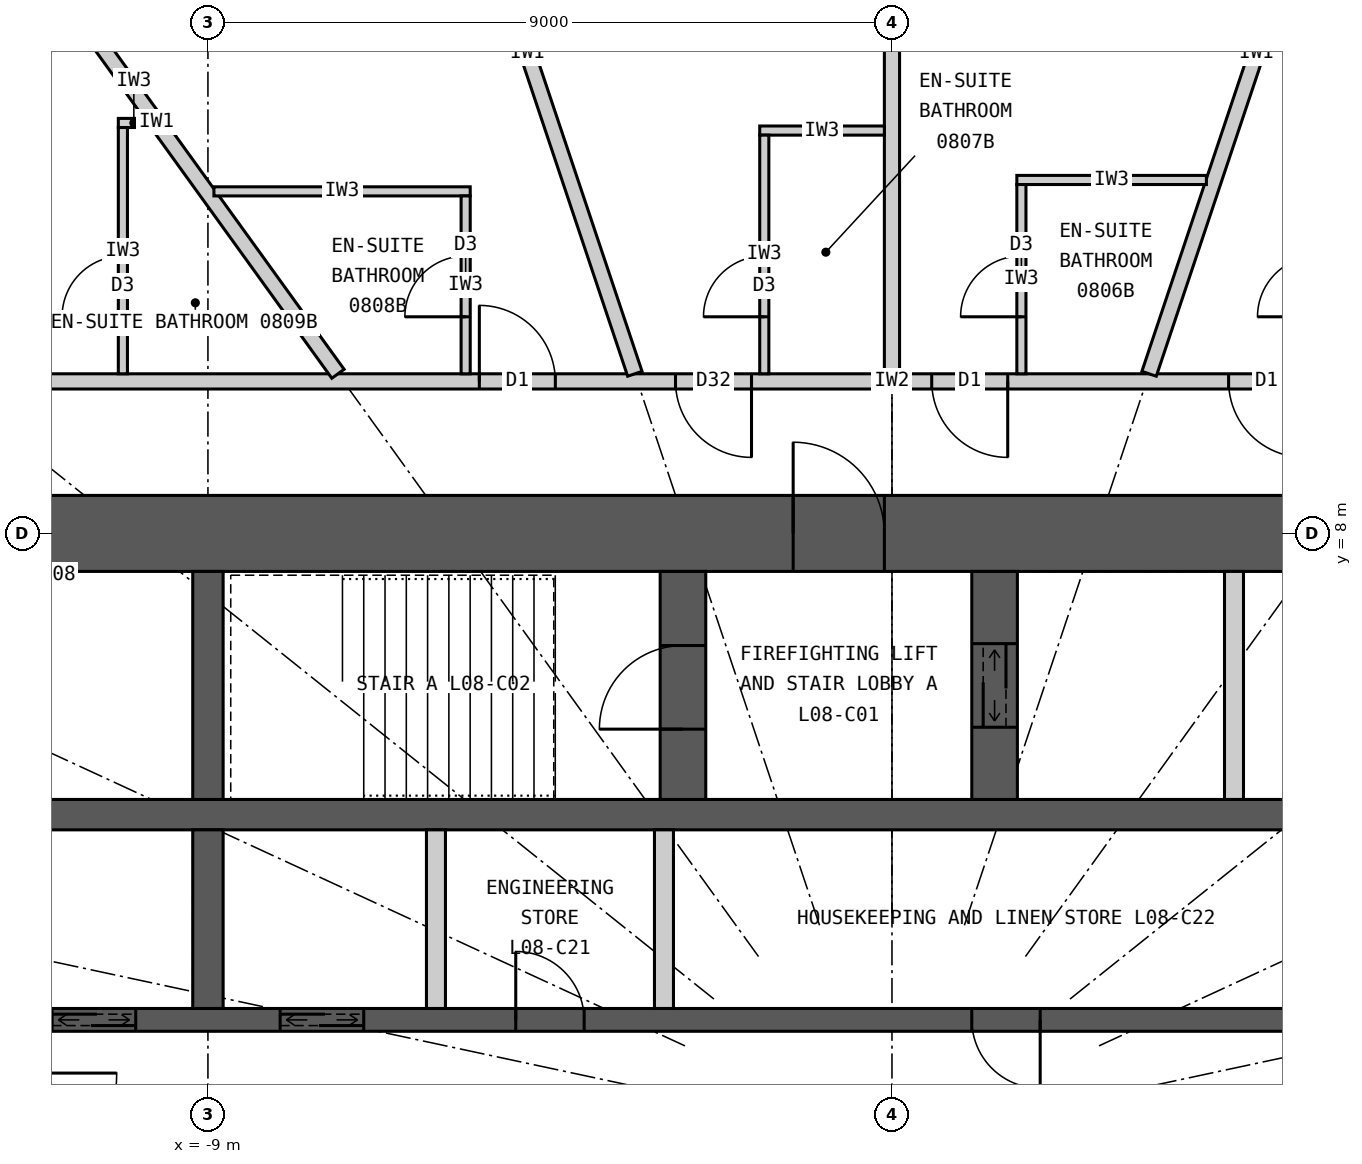
"""IFC4 building model, lengths in metres.
Left out: names, types, materials, properties, quantities, classifications, styles, units other than length and angle.
Written with IfcOpenShell. Run it as: python <this file> out.ifc"""

import sys

from ifc_helpers import new_model, si_unit, direction, frame, frame_2d, origin, place, context, subcontext, project, spatial, rectangle, extrude, element, fill, save


model = new_model("IFC4")
c1 = context("Model", 3, precision=1e-05, world=origin(), true_north=direction((0.0, 1.0)))
c2 = subcontext(c1, "Body", "Model", "MODEL_VIEW")
j1 = project(units=[si_unit("LENGTHUNIT", "METRE"), si_unit("PLANEANGLEUNIT", "RADIAN")], contexts=[c1])
p1 = place(None, origin())
s1 = spatial("IfcSite", under=j1, at=p1, CompositionType="ELEMENT")
p2 = place(p1, origin())
s2 = spatial("IfcBuilding", under=s1, at=p2, CompositionType="ELEMENT")
p3 = place(p2, frame((0.0, 0.0, 39.3)))
s3 = spatial("IfcBuildingStorey", under=s2, at=p3, CompositionType="ELEMENT", Elevation=39.3)
p4 = place(p3, frame((-12.5, 8.0, 0.0), z_axis=(0.0, 0.0, 1.0), x_axis=(1.0, 0.0, 0.0)))
e1 = element("IfcWall", 1, at=p4, inside=s3, PredefinedType="SHEAR", context=c2, shape_type="SweptSolid", body=[
    extrude(rectangle(XDim=25.0, YDim=1.0, at=frame_2d((12.5, 0.0))), origin(), (0.0, 0.0, 1.0), 3.3),
])
p5 = place(p4, frame((11.2, 0.0, 0.0)))
e2 = element("IfcOpeningElement", 2, at=p5, cuts=e1, PredefinedType="OPENING", context=c2, shape_type="SweptSolid", body=[
    extrude(rectangle(XDim=1.2, YDim=2.2, at=frame_2d((0.6, 1.1))), frame((0.0, 0.51, 0.0), z_axis=(0.0, -1.0, 0.0), x_axis=(1.0, 0.0, 0.0)), (0.0, 0.0, 1.0), 1.02),
])
p6 = place(p4, frame((18.8, 0.0, 0.0)))
e3 = element("IfcOpeningElement", 3, at=p6, cuts=e1, PredefinedType="OPENING", context=c2, shape_type="SweptSolid", body=[
    extrude(rectangle(XDim=0.9, YDim=2.2, at=frame_2d((0.45, 1.1))), frame((0.0, 0.51, 0.0), z_axis=(0.0, -1.0, 0.0), x_axis=(1.0, 0.0, 0.0)), (0.0, 0.0, 1.0), 1.02),
])
p7 = place(p3, frame((-11.5, 4.3, 0.0), z_axis=(0.0, 0.0, 1.0), x_axis=(1.0, 0.0, 0.0)))
e4 = element("IfcWall", 4, at=p7, inside=s3, PredefinedType="SHEAR", context=c2, shape_type="SweptSolid", body=[
    extrude(rectangle(XDim=23.0, YDim=0.4, at=frame_2d((11.5, 0.0))), origin(), (0.0, 0.0, 1.0), 3.3),
])
p8 = place(p3, frame((-11.5, 1.6, 0.0), z_axis=(0.0, 0.0, 1.0), x_axis=(1.0, 0.0, 0.0)))
e5 = element("IfcWall", 5, at=p8, inside=s3, PredefinedType="SHEAR", context=c2, shape_type="SweptSolid", body=[
    extrude(rectangle(XDim=23.0, YDim=0.3, at=frame_2d((11.5, 0.0))), origin(), (0.0, 0.0, 1.0), 3.3),
])
p9 = place(p8, frame((0.45, 0.0, 0.0)))
e6 = element("IfcOpeningElement", 6, at=p9, cuts=e5, PredefinedType="OPENING", context=c2, shape_type="SweptSolid", body=[
    extrude(rectangle(XDim=1.1, YDim=2.2, at=frame_2d((0.55, 1.1))), frame((0.0, 0.16, 0.0), z_axis=(0.0, -1.0, 0.0), x_axis=(1.0, 0.0, 0.0)), (0.0, 0.0, 1.0), 0.32),
])
p10 = place(p8, frame((3.45, 0.0, 0.0)))
e7 = element("IfcOpeningElement", 7, at=p10, cuts=e5, PredefinedType="OPENING", context=c2, shape_type="SweptSolid", body=[
    extrude(rectangle(XDim=1.1, YDim=2.2, at=frame_2d((0.55, 1.1))), frame((0.0, 0.16, 0.0), z_axis=(0.0, -1.0, 0.0), x_axis=(1.0, 0.0, 0.0)), (0.0, 0.0, 1.0), 0.32),
])
p11 = place(p8, frame((6.55, 0.0, 0.0)))
e8 = element("IfcOpeningElement", 8, at=p11, cuts=e5, PredefinedType="OPENING", context=c2, shape_type="SweptSolid", body=[
    extrude(rectangle(XDim=0.9, YDim=2.2, at=frame_2d((0.45, 1.1))), frame((0.0, 0.16, 0.0), z_axis=(0.0, -1.0, 0.0), x_axis=(1.0, 0.0, 0.0)), (0.0, 0.0, 1.0), 0.32),
])
p12 = place(p8, frame((12.55, 0.0, 0.0)))
e9 = element("IfcOpeningElement", 9, at=p12, cuts=e5, PredefinedType="OPENING", context=c2, shape_type="SweptSolid", body=[
    extrude(rectangle(XDim=0.9, YDim=2.2, at=frame_2d((0.45, 1.1))), frame((0.0, 0.16, 0.0), z_axis=(0.0, -1.0, 0.0), x_axis=(1.0, 0.0, 0.0)), (0.0, 0.0, 1.0), 0.32),
])
p13 = place(p3, frame((-9.0, 4.5, 0.0), z_axis=(0.0, 0.0, 1.0), x_axis=(0.0, 1.0, 0.0)))
e10 = element("IfcWall", 10, at=p13, inside=s3, PredefinedType="SHEAR", context=c2, shape_type="SweptSolid", body=[
    extrude(rectangle(XDim=3.0, YDim=0.4, at=frame_2d((1.5, 0.0))), origin(), (0.0, 0.0, 1.0), 3.3),
])
p14 = place(p3, frame((-9.0, 1.75, 0.0), z_axis=(0.0, 0.0, 1.0), x_axis=(0.0, 1.0, 0.0)))
e11 = element("IfcWall", 11, at=p14, inside=s3, PredefinedType="SHEAR", context=c2, shape_type="SweptSolid", body=[
    extrude(rectangle(XDim=2.35, YDim=0.4, at=frame_2d((1.175, 0.0))), origin(), (0.0, 0.0, 1.0), 3.3),
])
p15 = place(p3, frame((-2.75, 4.5, 0.0), z_axis=(0.0, 0.0, 1.0), x_axis=(0.0, 1.0, 0.0)))
e12 = element("IfcWall", 12, at=p15, inside=s3, PredefinedType="SHEAR", context=c2, shape_type="SweptSolid", body=[
    extrude(rectangle(XDim=3.0, YDim=0.6, at=frame_2d((1.5, 0.0))), origin(), (0.0, 0.0, 1.0), 3.3),
])
p16 = place(p15, frame((0.925, 0.0, 0.0)))
e13 = element("IfcOpeningElement", 13, at=p16, cuts=e12, PredefinedType="OPENING", context=c2, shape_type="SweptSolid", body=[
    extrude(rectangle(XDim=1.1, YDim=2.2, at=frame_2d((0.55, 1.1))), frame((0.0, 0.31, 0.0), z_axis=(0.0, -1.0, 0.0), x_axis=(1.0, 0.0, 0.0)), (0.0, 0.0, 1.0), 0.62),
])
p17 = place(p3, frame((1.35, 4.5, 0.0), z_axis=(0.0, 0.0, 1.0), x_axis=(0.0, 1.0, 0.0)))
e14 = element("IfcWall", 14, at=p17, inside=s3, PredefinedType="SHEAR", context=c2, shape_type="SweptSolid", body=[
    extrude(rectangle(XDim=3.0, YDim=0.6, at=frame_2d((1.5, 0.0))), origin(), (0.0, 0.0, 1.0), 3.3),
])
p18 = place(p17, frame((0.95, 0.0, 0.0)))
e15 = element("IfcOpeningElement", 15, at=p18, cuts=e14, PredefinedType="OPENING", context=c2, shape_type="SweptSolid", body=[
    extrude(rectangle(XDim=1.1, YDim=2.2, at=frame_2d((0.55, 1.1))), frame((0.0, 0.31, 0.0), z_axis=(0.0, -1.0, 0.0), x_axis=(1.0, 0.0, 0.0)), (0.0, 0.0, 1.0), 0.62),
])
p19 = place(p3, frame((4.5, 4.5, 0.0), z_axis=(0.0, 0.0, 1.0), x_axis=(0.0, 1.0, 0.0)))
e16 = element("IfcWall", 16, at=p19, inside=s3, PredefinedType="PARTITIONING", context=c2, shape_type="SweptSolid", body=[
    extrude(rectangle(XDim=3.0, YDim=0.25, at=frame_2d((1.5, 0.0))), origin(), (0.0, 0.0, 1.0), 3.3),
])
for number, where, z_axis, x_axis in (
    (17, (-6.0, 1.75, 0.0), (0.0, 0.0, 1.0), (0.0, 1.0, 0.0)),
    (18, (-3.0, 1.75, 0.0), (0.0, 0.0, 1.0), (0.0, 1.0, 0.0)),
):
    element("IfcWall", number, at=place(p3, frame(where, z_axis=z_axis, x_axis=x_axis)), inside=s3, PredefinedType="PARTITIONING", context=c2, shape_type="SweptSolid", body=[
        extrude(rectangle(XDim=2.35, YDim=0.25, at=frame_2d((1.175, 0.0))), origin(), (0.0, 0.0, 1.0), 3.3),
    ])
p20 = place(p3, frame((-14.1, 10.0, 0.0), z_axis=(0.0, 0.0, 1.0), x_axis=(1.0, 0.0, 0.0)))
e19 = element("IfcWall", 19, at=p20, inside=s3, PredefinedType="PARTITIONING", context=c2, shape_type="SweptSolid", body=[
    extrude(rectangle(XDim=28.2, YDim=0.2, at=frame_2d((14.1, 0.0))), origin(), (0.0, 0.0, 1.0), 3.12),
])
p21 = place(p20, frame((23.477, 0.0, 0.0)))
e20 = element("IfcOpeningElement", 20, at=p21, cuts=e19, PredefinedType="OPENING", context=c2, shape_type="SweptSolid", body=[
    extrude(rectangle(XDim=1.0, YDim=2.2, at=frame_2d((0.5, 1.1))), frame((0.0, 0.11, 0.0), z_axis=(0.0, -1.0, 0.0), x_axis=(1.0, 0.0, 0.0)), (0.0, 0.0, 1.0), 0.22),
])
p22 = place(p20, frame((18.529, 0.0, 0.0)))
e21 = element("IfcOpeningElement", 21, at=p22, cuts=e19, PredefinedType="OPENING", context=c2, shape_type="SweptSolid", body=[
    extrude(rectangle(XDim=1.0, YDim=2.2, at=frame_2d((0.5, 1.1))), frame((0.0, 0.11, 0.0), z_axis=(0.0, -1.0, 0.0), x_axis=(1.0, 0.0, 0.0)), (0.0, 0.0, 1.0), 0.22),
])
p23 = place(p20, frame((14.623, 0.0, 0.0)))
e22 = element("IfcOpeningElement", 22, at=p23, cuts=e19, PredefinedType="OPENING", context=c2, shape_type="SweptSolid", body=[
    extrude(rectangle(XDim=1.0, YDim=2.2, at=frame_2d((0.5, 1.1))), frame((0.0, 0.11, 0.0), z_axis=(0.0, -1.0, 0.0), x_axis=(1.0, 0.0, 0.0)), (0.0, 0.0, 1.0), 0.22),
])
p24 = place(p20, frame((11.252, 0.0, 0.0)))
e23 = element("IfcOpeningElement", 23, at=p24, cuts=e19, PredefinedType="OPENING", context=c2, shape_type="SweptSolid", body=[
    extrude(rectangle(XDim=1.0, YDim=2.1, at=frame_2d((0.5, 1.05))), frame((0.0, 0.11, 0.0), z_axis=(0.0, -1.0, 0.0), x_axis=(1.0, 0.0, 0.0)), (0.0, 0.0, 1.0), 0.22),
])
p25 = place(p20, frame((8.671, 0.0, 0.0)))
e24 = element("IfcOpeningElement", 24, at=p25, cuts=e19, PredefinedType="OPENING", context=c2, shape_type="SweptSolid", body=[
    extrude(rectangle(XDim=1.0, YDim=2.2, at=frame_2d((0.5, 1.1))), frame((0.0, 0.11, 0.0), z_axis=(0.0, -1.0, 0.0), x_axis=(1.0, 0.0, 0.0)), (0.0, 0.0, 1.0), 0.22),
])
p26 = place(p20, frame((1.616, 0.0, 0.0)))
e25 = element("IfcOpeningElement", 25, at=p26, cuts=e19, PredefinedType="OPENING", context=c2, shape_type="SweptSolid", body=[
    extrude(rectangle(XDim=1.0, YDim=2.2, at=frame_2d((0.5, 1.1))), frame((0.0, 0.11, 0.0), z_axis=(0.0, -1.0, 0.0), x_axis=(1.0, 0.0, 0.0)), (0.0, 0.0, 1.0), 0.22),
])
p27 = place(p3, frame((3.383, 10.1, 0.0), z_axis=(0.0, 0.0, 1.0), x_axis=(0.317593727596, 0.948226884344, 0.0)))
e26 = element("IfcWall", 26, at=p27, inside=s3, PredefinedType="PARTITIONING", context=c2, shape_type="SweptSolid", body=[
    extrude(rectangle(XDim=8.899, YDim=0.2, at=frame_2d((4.449, 0.0))), origin(), (0.0, 0.0, 1.0), 2.32),
])
p28 = place(p3, frame((0.0, 10.1, 0.0), z_axis=(0.0, 0.0, 1.0), x_axis=(0.0, 1.0, 0.0)))
e27 = element("IfcWall", 27, at=p28, inside=s3, PredefinedType="PARTITIONING", context=c2, shape_type="SweptSolid", body=[
    extrude(rectangle(XDim=9.05, YDim=0.2, at=frame_2d((4.525, 0.0))), origin(), (0.0, 0.0, 1.0), 2.32),
])
p29 = place(p3, frame((-3.383, 10.1, 0.0), z_axis=(0.0, 0.0, 1.0), x_axis=(-0.317593727596, 0.948226884344, 0.0)))
e28 = element("IfcWall", 28, at=p29, inside=s3, PredefinedType="PARTITIONING", context=c2, shape_type="SweptSolid", body=[
    extrude(rectangle(XDim=8.899, YDim=0.2, at=frame_2d((4.449, 0.0))), origin(), (0.0, 0.0, 1.0), 2.32),
])
p30 = place(p3, frame((-7.289, 10.1, 0.0), z_axis=(0.0, 0.0, 1.0), x_axis=(-0.585216319319, 0.810877216108, 0.0)))
e29 = element("IfcWall", 29, at=p30, inside=s3, PredefinedType="PARTITIONING", context=c2, shape_type="SweptSolid", body=[
    extrude(rectangle(XDim=8.16, YDim=0.2, at=frame_2d((4.08, 0.0))), origin(), (0.0, 0.0, 1.0), 2.32),
])
p31 = place(p3, frame((4.137, 12.65, 0.0), z_axis=(0.0, 0.0, 1.0), x_axis=(-1.0, 0.0, 0.0)))
e30 = element("IfcWall", 30, at=p31, inside=s3, PredefinedType="PARTITIONING", context=c2, shape_type="SweptSolid", body=[
    extrude(rectangle(XDim=2.494, YDim=0.12, at=frame_2d((1.247, 0.0))), origin(), (0.0, 0.0, 1.0), 3.12),
])
p32 = place(p3, frame((1.703, 10.1, 0.0), z_axis=(0.0, 0.0, 1.0), x_axis=(0.0, 1.0, 0.0)))
e31 = element("IfcWall", 31, at=p32, inside=s3, PredefinedType="PARTITIONING", context=c2, shape_type="SweptSolid", body=[
    extrude(rectangle(XDim=2.49, YDim=0.12, at=frame_2d((1.245, 0.0))), origin(), (0.0, 0.0, 1.0), 3.12),
])
p33 = place(p32, frame((0.75, 0.0, 0.0)))
e32 = element("IfcOpeningElement", 32, at=p33, cuts=e31, PredefinedType="OPENING", context=c2, shape_type="SweptSolid", body=[
    extrude(rectangle(XDim=0.8, YDim=2.1, at=frame_2d((0.4, 1.05))), frame((0.0, 0.07, 0.0), z_axis=(0.0, -1.0, 0.0), x_axis=(1.0, 0.0, 0.0)), (0.0, 0.0, 1.0), 0.14),
])
p34 = place(p3, frame((-0.1, 13.3, 0.0), z_axis=(0.0, 0.0, 1.0), x_axis=(-1.0, 0.0, 0.0)))
e33 = element("IfcWall", 33, at=p34, inside=s3, PredefinedType="PARTITIONING", context=c2, shape_type="SweptSolid", body=[
    extrude(rectangle(XDim=1.64, YDim=0.12, at=frame_2d((0.82, 0.0))), origin(), (0.0, 0.0, 1.0), 3.12),
])
p35 = place(p3, frame((-1.68, 10.1, 0.0), z_axis=(0.0, 0.0, 1.0), x_axis=(0.0, 1.0, 0.0)))
e34 = element("IfcWall", 34, at=p35, inside=s3, PredefinedType="PARTITIONING", context=c2, shape_type="SweptSolid", body=[
    extrude(rectangle(XDim=3.14, YDim=0.12, at=frame_2d((1.57, 0.0))), origin(), (0.0, 0.0, 1.0), 3.12),
])
p36 = place(p35, frame((0.75, 0.0, 0.0)))
e35 = element("IfcOpeningElement", 35, at=p36, cuts=e34, PredefinedType="OPENING", context=c2, shape_type="SweptSolid", body=[
    extrude(rectangle(XDim=0.8, YDim=2.1, at=frame_2d((0.4, 1.05))), frame((0.0, 0.07, 0.0), z_axis=(0.0, -1.0, 0.0), x_axis=(1.0, 0.0, 0.0)), (0.0, 0.0, 1.0), 0.14),
])
p37 = place(p3, frame((-8.921, 12.5, 0.0), z_axis=(0.0, 0.0, 1.0), x_axis=(1.0, 0.0, 0.0)))
e36 = element("IfcWall", 36, at=p37, inside=s3, PredefinedType="PARTITIONING", context=c2, shape_type="SweptSolid", body=[
    extrude(rectangle(XDim=3.372, YDim=0.12, at=frame_2d((1.686, 0.0))), origin(), (0.0, 0.0, 1.0), 3.12),
])
p38 = place(p3, frame((-5.609, 10.1, 0.0), z_axis=(0.0, 0.0, 1.0), x_axis=(0.0, 1.0, 0.0)))
e37 = element("IfcWall", 37, at=p38, inside=s3, PredefinedType="PARTITIONING", context=c2, shape_type="SweptSolid", body=[
    extrude(rectangle(XDim=2.34, YDim=0.12, at=frame_2d((1.17, 0.0))), origin(), (0.0, 0.0, 1.0), 3.12),
])
p39 = place(p38, frame((0.75, 0.0, 0.0)))
e38 = element("IfcOpeningElement", 38, at=p39, cuts=e37, PredefinedType="OPENING", context=c2, shape_type="SweptSolid", body=[
    extrude(rectangle(XDim=0.8, YDim=2.1, at=frame_2d((0.4, 1.05))), frame((0.0, 0.07, 0.0), z_axis=(0.0, -1.0, 0.0), x_axis=(1.0, 0.0, 0.0)), (0.0, 0.0, 1.0), 0.14),
])
p40 = place(p3, frame((-9.771, 13.4, 0.0), z_axis=(0.0, 0.0, 1.0), x_axis=(-1.0, 0.0, 0.0)))
e39 = element("IfcWall", 39, at=p40, inside=s3, PredefinedType="PARTITIONING", context=c2, shape_type="SweptSolid", body=[
    extrude(rectangle(XDim=0.408, YDim=0.12, at=frame_2d((0.204, 0.0))), origin(), (0.0, 0.0, 1.0), 3.12),
])
p41 = place(p3, frame((-10.119, 10.1, 0.0), z_axis=(0.0, 0.0, 1.0), x_axis=(0.0, 1.0, 0.0)))
e40 = element("IfcWall", 40, at=p41, inside=s3, PredefinedType="PARTITIONING", context=c2, shape_type="SweptSolid", body=[
    extrude(rectangle(XDim=3.24, YDim=0.12, at=frame_2d((1.62, 0.0))), origin(), (0.0, 0.0, 1.0), 3.12),
])
p42 = place(p41, frame((0.75, 0.0, 0.0)))
e41 = element("IfcOpeningElement", 41, at=p42, cuts=e40, PredefinedType="OPENING", context=c2, shape_type="SweptSolid", body=[
    extrude(rectangle(XDim=0.8, YDim=2.1, at=frame_2d((0.4, 1.05))), frame((0.0, 0.07, 0.0), z_axis=(0.0, -1.0, 0.0), x_axis=(1.0, 0.0, 0.0)), (0.0, 0.0, 1.0), 0.14),
])
p43 = place(p22, origin())
e42 = element("IfcDoor", 42, at=p43, inside=s3, OperationType="SINGLE_SWING_RIGHT", PredefinedType="DOOR", context=c2, shape_type="SweptSolid", body=[
    extrude(rectangle(XDim=1.0, YDim=2.2, at=frame_2d((0.5, 1.1))), frame((0.0, 0.025, 0.0), z_axis=(0.0, -1.0, 0.0), x_axis=(1.0, 0.0, 0.0)), (0.0, 0.0, 1.0), 0.05),
])
fill(e21, e42)
p44 = place(p33, origin())
e43 = element("IfcDoor", 43, at=p44, inside=s3, OperationType="SINGLE_SWING_LEFT", PredefinedType="DOOR", context=c2, shape_type="SweptSolid", body=[
    extrude(rectangle(XDim=0.8, YDim=2.1, at=frame_2d((0.4, 1.05))), frame((0.0, 0.025, 0.0), z_axis=(0.0, -1.0, 0.0), x_axis=(1.0, 0.0, 0.0)), (0.0, 0.0, 1.0), 0.05),
])
fill(e32, e43)
p45 = place(p23, origin())
e44 = element("IfcDoor", 44, at=p45, inside=s3, OperationType="SINGLE_SWING_RIGHT", PredefinedType="DOOR", context=c2, shape_type="SweptSolid", body=[
    extrude(rectangle(XDim=1.0, YDim=2.2, at=frame_2d((0.5, 1.1))), frame((0.0, 0.025, 0.0), z_axis=(0.0, -1.0, 0.0), x_axis=(1.0, 0.0, 0.0)), (0.0, 0.0, 1.0), 0.05),
])
fill(e22, e44)
p46 = place(p36, origin())
e45 = element("IfcDoor", 45, at=p46, inside=s3, OperationType="SINGLE_SWING_LEFT", PredefinedType="DOOR", context=c2, shape_type="SweptSolid", body=[
    extrude(rectangle(XDim=0.8, YDim=2.1, at=frame_2d((0.4, 1.05))), frame((0.0, 0.025, 0.0), z_axis=(0.0, -1.0, 0.0), x_axis=(1.0, 0.0, 0.0)), (0.0, 0.0, 1.0), 0.05),
])
fill(e35, e45)
p47 = place(p24, origin())
e46 = element("IfcDoor", 46, at=p47, inside=s3, OperationType="SINGLE_SWING_RIGHT", PredefinedType="DOOR", context=c2, shape_type="SweptSolid", body=[
    extrude(rectangle(XDim=1.0, YDim=2.1, at=frame_2d((0.5, 1.05))), frame((0.0, 0.025, 0.0), z_axis=(0.0, -1.0, 0.0), x_axis=(1.0, 0.0, 0.0)), (0.0, 0.0, 1.0), 0.05),
])
fill(e23, e46)
p48 = place(p39, origin())
e47 = element("IfcDoor", 47, at=p48, inside=s3, OperationType="SINGLE_SWING_LEFT", PredefinedType="DOOR", context=c2, shape_type="SweptSolid", body=[
    extrude(rectangle(XDim=0.8, YDim=2.1, at=frame_2d((0.4, 1.05))), frame((0.0, 0.025, 0.0), z_axis=(0.0, -1.0, 0.0), x_axis=(1.0, 0.0, 0.0)), (0.0, 0.0, 1.0), 0.05),
])
fill(e38, e47)
p49 = place(p25, origin())
e48 = element("IfcDoor", 48, at=p49, inside=s3, OperationType="SINGLE_SWING_LEFT", PredefinedType="DOOR", context=c2, shape_type="SweptSolid", body=[
    extrude(rectangle(XDim=1.0, YDim=2.2, at=frame_2d((0.5, 1.1))), frame((0.0, 0.025, 0.0), z_axis=(0.0, -1.0, 0.0), x_axis=(1.0, 0.0, 0.0)), (0.0, 0.0, 1.0), 0.05),
])
fill(e24, e48)
p50 = place(p42, origin())
e49 = element("IfcDoor", 49, at=p50, inside=s3, OperationType="SINGLE_SWING_LEFT", PredefinedType="DOOR", context=c2, shape_type="SweptSolid", body=[
    extrude(rectangle(XDim=0.8, YDim=2.1, at=frame_2d((0.4, 1.05))), frame((0.0, 0.025, 0.0), z_axis=(0.0, -1.0, 0.0), x_axis=(1.0, 0.0, 0.0)), (0.0, 0.0, 1.0), 0.05),
])
fill(e41, e49)
p51 = place(p5, origin())
e50 = element("IfcDoor", 50, at=p51, inside=s3, OperationType="SINGLE_SWING_LEFT", PredefinedType="DOOR", context=c2, shape_type="SweptSolid", body=[
    extrude(rectangle(XDim=1.2, YDim=2.2, at=frame_2d((0.6, 1.1))), frame((0.0, 0.025, 0.0), z_axis=(0.0, -1.0, 0.0), x_axis=(1.0, 0.0, 0.0)), (0.0, 0.0, 1.0), 0.05),
])
fill(e2, e50)
p52 = place(p16, origin())
e51 = element("IfcDoor", 51, at=p52, inside=s3, OperationType="SINGLE_SWING_LEFT", PredefinedType="DOOR", context=c2, shape_type="SweptSolid", body=[
    extrude(rectangle(XDim=1.1, YDim=2.2, at=frame_2d((0.55, 1.1))), frame((0.0, 0.025, 0.0), z_axis=(0.0, -1.0, 0.0), x_axis=(1.0, 0.0, 0.0)), (0.0, 0.0, 1.0), 0.05),
])
fill(e13, e51)
p53 = place(p18, origin())
e52 = element("IfcDoor", 52, at=p53, inside=s3, OperationType="DOUBLE_DOOR_SLIDING", PredefinedType="DOOR", context=c2, shape_type="SweptSolid", body=[
    extrude(rectangle(XDim=1.1, YDim=2.2, at=frame_2d((0.55, 1.1))), frame((0.0, 0.025, 0.0), z_axis=(0.0, -1.0, 0.0), x_axis=(1.0, 0.0, 0.0)), (0.0, 0.0, 1.0), 0.05),
])
fill(e15, e52)
p54 = place(p9, origin())
e53 = element("IfcDoor", 53, at=p54, inside=s3, OperationType="DOUBLE_DOOR_SLIDING", PredefinedType="DOOR", context=c2, shape_type="SweptSolid", body=[
    extrude(rectangle(XDim=1.1, YDim=2.2, at=frame_2d((0.55, 1.1))), frame((0.0, 0.025, 0.0), z_axis=(0.0, -1.0, 0.0), x_axis=(1.0, 0.0, 0.0)), (0.0, 0.0, 1.0), 0.05),
])
fill(e6, e53)
p55 = place(p10, origin())
e54 = element("IfcDoor", 54, at=p55, inside=s3, OperationType="DOUBLE_DOOR_SLIDING", PredefinedType="DOOR", context=c2, shape_type="SweptSolid", body=[
    extrude(rectangle(XDim=1.1, YDim=2.2, at=frame_2d((0.55, 1.1))), frame((0.0, 0.025, 0.0), z_axis=(0.0, -1.0, 0.0), x_axis=(1.0, 0.0, 0.0)), (0.0, 0.0, 1.0), 0.05),
])
fill(e7, e54)
p56 = place(p11, origin())
e55 = element("IfcDoor", 55, at=p56, inside=s3, OperationType="SINGLE_SWING_LEFT", PredefinedType="DOOR", context=c2, shape_type="SweptSolid", body=[
    extrude(rectangle(XDim=0.9, YDim=2.2, at=frame_2d((0.45, 1.1))), frame((0.0, 0.025, 0.0), z_axis=(0.0, -1.0, 0.0), x_axis=(1.0, 0.0, 0.0)), (0.0, 0.0, 1.0), 0.05),
])
fill(e8, e55)
p57 = place(p12, origin())
e56 = element("IfcDoor", 56, at=p57, inside=s3, OperationType="SINGLE_SWING_RIGHT", PredefinedType="DOOR", context=c2, shape_type="SweptSolid", body=[
    extrude(rectangle(XDim=0.9, YDim=2.2, at=frame_2d((0.45, 1.1))), frame((0.0, 0.025, 0.0), z_axis=(0.0, -1.0, 0.0), x_axis=(1.0, 0.0, 0.0)), (0.0, 0.0, 1.0), 0.05),
])
fill(e9, e56)
save(model, sys.argv[1])
